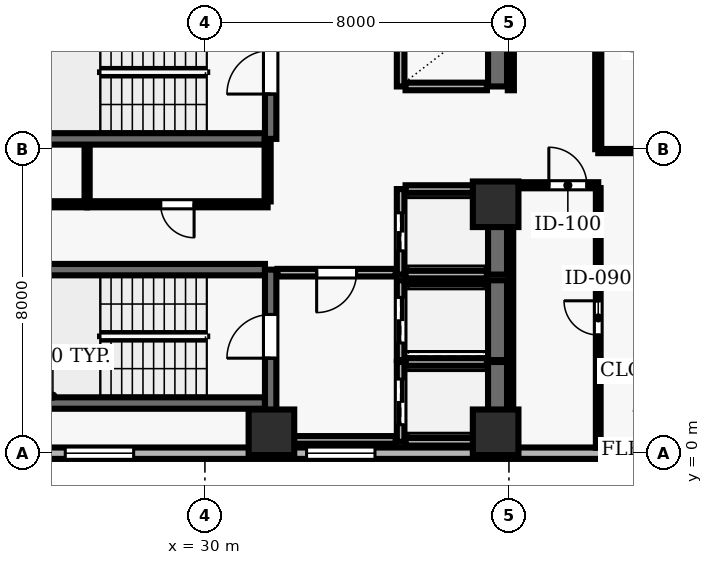
"""IFC4 building model, lengths in metres.
Left out: names, types, materials, properties, quantities, classifications, styles, units other than length and angle.
Written with IfcOpenShell. Run it as: python <this file> out.ifc"""

import sys

from ifc_helpers import new_model, si_unit, direction, frame, frame_2d, origin, origin_2d, place, context, subcontext, project, spatial, rectangle, extrude, element, fill, save


model = new_model("IFC4")
c1 = context("Model", 3, precision=1e-05, world=origin(), true_north=direction((0.0, 1.0)))
c2 = subcontext(c1, "Body", "Model", "MODEL_VIEW")
j1 = project(units=[si_unit("LENGTHUNIT", "METRE"), si_unit("PLANEANGLEUNIT", "RADIAN")], contexts=[c1])
p1 = place(None, origin())
s1 = spatial("IfcSite", under=j1, at=p1, CompositionType="ELEMENT")
p2 = place(p1, origin())
s2 = spatial("IfcBuilding", under=s1, at=p2, CompositionType="ELEMENT")
p3 = place(p2, frame((0.0, 0.0, 158.0)))
s3 = spatial("IfcBuildingStorey", under=s2, at=p3, CompositionType="ELEMENT", Elevation=158.0)
for number, where, z_axis, x_axis in (
    (1, (31.75, 0.55, 0.0), (0.0, 0.0, 1.0), (1.0, 0.0, 0.0)),
    (2, (37.65, 0.55, 0.0), (0.0, 0.0, 1.0), (1.0, 0.0, 0.0)),
    (3, (37.65, 6.55, 0.0), (0.0, 0.0, 1.0), (1.0, 0.0, 0.0)),
):
    element("IfcColumn", number, at=place(p3, frame(where, z_axis=z_axis, x_axis=x_axis)), inside=s3, PredefinedType="COLUMN", context=c2, shape_type="SweptSolid", body=[
        extrude(rectangle(XDim=1.2, YDim=1.2, at=origin_2d()), origin(), (0.0, 0.0, 1.0), 3.9),
    ])
p4 = place(p3, frame((24.5, 0.0, 0.0), z_axis=(0.0, 0.0, 1.0), x_axis=(1.0, 0.0, 0.0)))
e4 = element("IfcWall", 4, at=p4, inside=s3, PredefinedType="SOLIDWALL", context=c2, shape_type="SweptSolid", body=[
    extrude(rectangle(XDim=43.6, YDim=0.3, at=frame_2d((21.8, 0.0))), origin(), (0.0, 0.0, 1.0), 3.69),
])
p5 = place(p4, frame((1.825, 0.0, 0.9)))
e5 = element("IfcOpeningElement", 5, at=p5, cuts=e4, PredefinedType="OPENING", context=c2, shape_type="SweptSolid", body=[
    extrude(rectangle(XDim=1.8, YDim=1.6, at=frame_2d((0.9, 0.8))), frame((0.0, 0.16, 0.0), z_axis=(0.0, -1.0, 0.0), x_axis=(1.0, 0.0, 0.0)), (0.0, 0.0, 1.0), 0.32),
])
p6 = place(p4, frame((8.175, 0.0, 0.9)))
e6 = element("IfcOpeningElement", 6, at=p6, cuts=e4, PredefinedType="OPENING", context=c2, shape_type="SweptSolid", body=[
    extrude(rectangle(XDim=1.8, YDim=1.6, at=frame_2d((0.9, 0.8))), frame((0.0, 0.16, 0.0), z_axis=(0.0, -1.0, 0.0), x_axis=(1.0, 0.0, 0.0)), (0.0, 0.0, 1.0), 0.32),
])
p7 = place(p4, frame((18.175, 0.0, 0.9)))
e7 = element("IfcOpeningElement", 7, at=p7, cuts=e4, PredefinedType="OPENING", context=c2, shape_type="SweptSolid", body=[
    extrude(rectangle(XDim=1.8, YDim=1.6, at=frame_2d((0.9, 0.8))), frame((0.0, 0.16, 0.0), z_axis=(0.0, -1.0, 0.0), x_axis=(1.0, 0.0, 0.0)), (0.0, 0.0, 1.0), 0.32),
])
p8 = place(p4, frame((24.525, 0.0, 0.9)))
e8 = element("IfcOpeningElement", 8, at=p8, cuts=e4, PredefinedType="OPENING", context=c2, shape_type="SweptSolid", body=[
    extrude(rectangle(XDim=1.8, YDim=1.6, at=frame_2d((0.9, 0.8))), frame((0.0, 0.16, 0.0), z_axis=(0.0, -1.0, 0.0), x_axis=(1.0, 0.0, 0.0)), (0.0, 0.0, 1.0), 0.32),
])
p9 = place(p4, frame((29.075, 0.0, 0.9)))
e9 = element("IfcOpeningElement", 9, at=p9, cuts=e4, PredefinedType="OPENING", context=c2, shape_type="SweptSolid", body=[
    extrude(rectangle(XDim=1.8, YDim=1.6, at=frame_2d((0.9, 0.8))), frame((0.0, 0.16, 0.0), z_axis=(0.0, -1.0, 0.0), x_axis=(1.0, 0.0, 0.0)), (0.0, 0.0, 1.0), 0.32),
])
p10 = place(p4, frame((34.525, 0.0, 0.9)))
e10 = element("IfcOpeningElement", 10, at=p10, cuts=e4, PredefinedType="OPENING", context=c2, shape_type="SweptSolid", body=[
    extrude(rectangle(XDim=1.8, YDim=1.6, at=frame_2d((0.9, 0.8))), frame((0.0, 0.16, 0.0), z_axis=(0.0, -1.0, 0.0), x_axis=(1.0, 0.0, 0.0)), (0.0, 0.0, 1.0), 0.32),
])
p11 = place(p4, frame((39.975, 0.0, 0.9)))
e11 = element("IfcOpeningElement", 11, at=p11, cuts=e4, PredefinedType="OPENING", context=c2, shape_type="SweptSolid", body=[
    extrude(rectangle(XDim=1.8, YDim=1.6, at=frame_2d((0.9, 0.8))), frame((0.0, 0.16, 0.0), z_axis=(0.0, -1.0, 0.0), x_axis=(1.0, 0.0, 0.0)), (0.0, 0.0, 1.0), 0.32),
])
for number, where, z_axis, x_axis in (
    (12, (31.58, 4.83, 0.0), (0.0, 0.0, 1.0), (-1.0, 0.0, 0.0)),
    (13, (23.22, 1.32, 0.0), (0.0, 0.0, 1.0), (1.0, 0.0, 0.0)),
):
    element("IfcWall", number, at=place(p3, frame(where, z_axis=z_axis, x_axis=x_axis)), inside=s3, PredefinedType="SHEAR", context=c2, shape_type="SweptSolid", body=[
        extrude(rectangle(XDim=8.36, YDim=0.3, at=frame_2d((4.18, 0.0))), origin(), (0.0, 0.0, 1.0), 3.69),
    ])
p12 = place(p3, frame((31.73, 0.96, 0.0), z_axis=(0.0, 0.0, 1.0), x_axis=(0.0, 1.0, 0.0)))
e14 = element("IfcWall", 14, at=p12, inside=s3, PredefinedType="SHEAR", context=c2, shape_type="SweptSolid", body=[
    extrude(rectangle(XDim=3.87, YDim=0.3, at=frame_2d((1.935, 0.0))), origin(), (0.0, 0.0, 1.0), 3.69),
])
p13 = place(p12, frame((1.54, 0.0, 0.0)))
e15 = element("IfcOpeningElement", 15, at=p13, cuts=e14, PredefinedType="OPENING", context=c2, shape_type="SweptSolid", body=[
    extrude(rectangle(XDim=1.15, YDim=2.15, at=frame_2d((0.575, 1.075))), frame((0.0, 0.16, 0.0), z_axis=(0.0, -1.0, 0.0), x_axis=(1.0, 0.0, 0.0)), (0.0, 0.0, 1.0), 0.32),
])
p14 = place(p3, frame((23.22, 8.27, 0.0), z_axis=(0.0, 0.0, 1.0), x_axis=(1.0, 0.0, 0.0)))
e16 = element("IfcWall", 16, at=p14, inside=s3, PredefinedType="SHEAR", context=c2, shape_type="SweptSolid", body=[
    extrude(rectangle(XDim=8.36, YDim=0.3, at=frame_2d((4.18, 0.0))), origin(), (0.0, 0.0, 1.0), 3.69),
])
p15 = place(p3, frame((31.73, 8.27, 0.0), z_axis=(0.0, 0.0, 1.0), x_axis=(0.0, 1.0, 0.0)))
e17 = element("IfcWall", 17, at=p15, inside=s3, PredefinedType="SHEAR", context=c2, shape_type="SweptSolid", body=[
    extrude(rectangle(XDim=3.51, YDim=0.3, at=frame_2d((1.755, 0.0))), origin(), (0.0, 0.0, 1.0), 3.69),
])
p16 = place(p15, frame((1.18, 0.0, 0.0)))
e18 = element("IfcOpeningElement", 18, at=p16, cuts=e17, PredefinedType="OPENING", context=c2, shape_type="SweptSolid", body=[
    extrude(rectangle(XDim=1.15, YDim=2.15, at=frame_2d((0.575, 1.075))), frame((0.0, 0.16, 0.0), z_axis=(0.0, -1.0, 0.0), x_axis=(1.0, 0.0, 0.0)), (0.0, 0.0, 1.0), 0.32),
])
p17 = place(p3, frame((35.15, 2.4, 0.0), z_axis=(0.0, 0.0, 1.0), x_axis=(0.0, -1.0, 0.0)))
e19 = element("IfcWall", 19, at=p17, inside=s3, PredefinedType="SOLIDWALL", context=c2, shape_type="SweptSolid", body=[
    extrude(rectangle(XDim=2.1, YDim=0.2, at=frame_2d((1.05, 0.0))), origin(), (0.0, 0.0, 1.0), 3.69),
])
p18 = place(p17, frame((0.45, 0.0, 0.0)))
e20 = element("IfcOpeningElement", 20, at=p18, cuts=e19, PredefinedType="OPENING", context=c2, shape_type="SweptSolid", body=[
    extrude(rectangle(XDim=1.2, YDim=2.15, at=frame_2d((0.6, 1.075))), frame((0.0, 0.11, 0.0), z_axis=(0.0, -1.0, 0.0), x_axis=(1.0, 0.0, 0.0)), (0.0, 0.0, 1.0), 0.22),
])
p19 = place(p3, frame((37.7, 0.3, 0.0), z_axis=(0.0, 0.0, 1.0), x_axis=(0.0, 1.0, 0.0)))
e21 = element("IfcWall", 21, at=p19, inside=s3, PredefinedType="SHEAR", context=c2, shape_type="SweptSolid", body=[
    extrude(rectangle(XDim=2.1, YDim=0.5, at=frame_2d((1.05, 0.0))), origin(), (0.0, 0.0, 1.0), 3.69),
])
for number, where, z_axis, x_axis in (
    (22, (35.28, 0.3, 0.0), (0.0, 0.0, 1.0), (1.0, 0.0, 0.0)),
    (23, (37.42, 2.4, 0.0), (0.0, 0.0, 1.0), (-1.0, 0.0, 0.0)),
):
    element("IfcWall", number, at=place(p3, frame(where, z_axis=z_axis, x_axis=x_axis)), inside=s3, PredefinedType="SOLIDWALL", context=c2, shape_type="SweptSolid", body=[
        extrude(rectangle(XDim=2.14, YDim=0.2, at=frame_2d((1.07, 0.0))), origin(), (0.0, 0.0, 1.0), 3.69),
    ])
p20 = place(p3, frame((35.15, 4.55, 0.0), z_axis=(0.0, 0.0, 1.0), x_axis=(0.0, -1.0, 0.0)))
e24 = element("IfcWall", 24, at=p20, inside=s3, PredefinedType="SOLIDWALL", context=c2, shape_type="SweptSolid", body=[
    extrude(rectangle(XDim=2.1, YDim=0.2, at=frame_2d((1.05, 0.0))), origin(), (0.0, 0.0, 1.0), 3.69),
])
p21 = place(p20, frame((0.45, 0.0, 0.0)))
e25 = element("IfcOpeningElement", 25, at=p21, cuts=e24, PredefinedType="OPENING", context=c2, shape_type="SweptSolid", body=[
    extrude(rectangle(XDim=1.2, YDim=2.15, at=frame_2d((0.6, 1.075))), frame((0.0, 0.11, 0.0), z_axis=(0.0, -1.0, 0.0), x_axis=(1.0, 0.0, 0.0)), (0.0, 0.0, 1.0), 0.22),
])
p22 = place(p3, frame((37.7, 2.45, 0.0), z_axis=(0.0, 0.0, 1.0), x_axis=(0.0, 1.0, 0.0)))
e26 = element("IfcWall", 26, at=p22, inside=s3, PredefinedType="SHEAR", context=c2, shape_type="SweptSolid", body=[
    extrude(rectangle(XDim=2.1, YDim=0.5, at=frame_2d((1.05, 0.0))), origin(), (0.0, 0.0, 1.0), 3.69),
])
p23 = place(p3, frame((37.42, 4.55, 0.0), z_axis=(0.0, 0.0, 1.0), x_axis=(-1.0, 0.0, 0.0)))
e27 = element("IfcWall", 27, at=p23, inside=s3, PredefinedType="SOLIDWALL", context=c2, shape_type="SweptSolid", body=[
    extrude(rectangle(XDim=2.14, YDim=0.2, at=frame_2d((1.07, 0.0))), origin(), (0.0, 0.0, 1.0), 3.69),
])
p24 = place(p3, frame((35.15, 6.95, 0.0), z_axis=(0.0, 0.0, 1.0), x_axis=(0.0, -1.0, 0.0)))
e28 = element("IfcWall", 28, at=p24, inside=s3, PredefinedType="SOLIDWALL", context=c2, shape_type="SweptSolid", body=[
    extrude(rectangle(XDim=2.25, YDim=0.2, at=frame_2d((1.125, 0.0))), origin(), (0.0, 0.0, 1.0), 3.69),
])
p25 = place(p24, frame((0.625, 0.0, 0.0)))
e29 = element("IfcOpeningElement", 29, at=p25, cuts=e28, PredefinedType="OPENING", context=c2, shape_type="SweptSolid", body=[
    extrude(rectangle(XDim=1.0, YDim=2.1, at=frame_2d((0.5, 1.05))), frame((0.0, 0.11, 0.0), z_axis=(0.0, -1.0, 0.0), x_axis=(1.0, 0.0, 0.0)), (0.0, 0.0, 1.0), 0.22),
])
p26 = place(p3, frame((37.7, 4.7, 0.0), z_axis=(0.0, 0.0, 1.0), x_axis=(0.0, 1.0, 0.0)))
e30 = element("IfcWall", 30, at=p26, inside=s3, PredefinedType="SHEAR", context=c2, shape_type="SweptSolid", body=[
    extrude(rectangle(XDim=2.25, YDim=0.5, at=frame_2d((1.125, 0.0))), origin(), (0.0, 0.0, 1.0), 3.69),
])
for number, where, z_axis, x_axis in (
    (31, (35.28, 4.7, 0.0), (0.0, 0.0, 1.0), (1.0, 0.0, 0.0)),
    (32, (37.42, 6.95, 0.0), (0.0, 0.0, 1.0), (-1.0, 0.0, 0.0)),
):
    element("IfcWall", number, at=place(p3, frame(where, z_axis=z_axis, x_axis=x_axis)), inside=s3, PredefinedType="SOLIDWALL", context=c2, shape_type="SweptSolid", body=[
        extrude(rectangle(XDim=2.14, YDim=0.2, at=frame_2d((1.07, 0.0))), origin(), (0.0, 0.0, 1.0), 3.69),
    ])
p27 = place(p3, frame((35.15, 11.55, 0.0), z_axis=(0.0, 0.0, 1.0), x_axis=(0.0, -1.0, 0.0)))
e33 = element("IfcWall", 33, at=p27, inside=s3, PredefinedType="SOLIDWALL", context=c2, shape_type="SweptSolid", body=[
    extrude(rectangle(XDim=1.9, YDim=0.2, at=frame_2d((0.95, 0.0))), origin(), (0.0, 0.0, 1.0), 3.69),
])
p28 = place(p3, frame((37.7, 9.65, 0.0), z_axis=(0.0, 0.0, 1.0), x_axis=(0.0, 1.0, 0.0)))
e34 = element("IfcWall", 34, at=p28, inside=s3, PredefinedType="SHEAR", context=c2, shape_type="SweptSolid", body=[
    extrude(rectangle(XDim=1.9, YDim=0.5, at=frame_2d((0.95, 0.0))), origin(), (0.0, 0.0, 1.0), 3.69),
])
p29 = place(p3, frame((35.28, 9.65, 0.0), z_axis=(0.0, 0.0, 1.0), x_axis=(1.0, 0.0, 0.0)))
e35 = element("IfcWall", 35, at=p29, inside=s3, PredefinedType="SOLIDWALL", context=c2, shape_type="SweptSolid", body=[
    extrude(rectangle(XDim=2.14, YDim=0.2, at=frame_2d((1.07, 0.0))), origin(), (0.0, 0.0, 1.0), 3.69),
])
p30 = place(p3, frame((26.9, 6.55, 0.0), z_axis=(0.0, 0.0, 1.0), x_axis=(-1.0, 0.0, 0.0)))
e36 = element("IfcWall", 36, at=p30, inside=s3, PredefinedType="PARTITIONING", context=c2, shape_type="SweptSolid", body=[
    extrude(rectangle(XDim=4.7, YDim=0.16, at=frame_2d((2.35, 0.0))), origin(), (0.0, 0.0, 1.0), 3.69),
])
p31 = place(p30, frame((1.91, 0.0, 0.0)))
e37 = element("IfcOpeningElement", 37, at=p31, cuts=e36, PredefinedType="OPENING", context=c2, shape_type="SweptSolid", body=[
    extrude(rectangle(XDim=0.88, YDim=2.1, at=frame_2d((0.44, 1.05))), frame((0.0, 0.09, 0.0), z_axis=(0.0, -1.0, 0.0), x_axis=(1.0, 0.0, 0.0)), (0.0, 0.0, 1.0), 0.18),
])
p32 = place(p3, frame((31.65, 0.35, 0.0), z_axis=(0.0, 0.0, 1.0), x_axis=(1.0, 0.0, 0.0)))
e38 = element("IfcWall", 38, at=p32, inside=s3, PredefinedType="SOLIDWALL", context=c2, shape_type="SweptSolid", body=[
    extrude(rectangle(XDim=3.37, YDim=0.2, at=frame_2d((1.685, 0.0))), origin(), (0.0, 0.0, 1.0), 3.69),
])
p33 = place(p3, frame((31.65, 6.55, 0.0), z_axis=(0.0, 0.0, 1.0), x_axis=(-1.0, 0.0, 0.0)))
e39 = element("IfcWall", 39, at=p33, inside=s3, PredefinedType="PARTITIONING", context=c2, shape_type="SweptSolid", body=[
    extrude(rectangle(XDim=4.75, YDim=0.16, at=frame_2d((2.375, 0.0))), origin(), (0.0, 0.0, 1.0), 3.69),
])
p34 = place(p33, frame((1.935, 0.0, 0.0)))
e40 = element("IfcOpeningElement", 40, at=p34, cuts=e39, PredefinedType="OPENING", context=c2, shape_type="SweptSolid", body=[
    extrude(rectangle(XDim=0.88, YDim=2.1, at=frame_2d((0.44, 1.05))), frame((0.0, 0.09, 0.0), z_axis=(0.0, -1.0, 0.0), x_axis=(1.0, 0.0, 0.0)), (0.0, 0.0, 1.0), 0.18),
])
p35 = place(p3, frame((35.02, 4.75, 0.0), z_axis=(0.0, 0.0, 1.0), x_axis=(-1.0, 0.0, 0.0)))
e41 = element("IfcWall", 41, at=p35, inside=s3, PredefinedType="SOLIDWALL", context=c2, shape_type="SweptSolid", body=[
    extrude(rectangle(XDim=3.11, YDim=0.2, at=frame_2d((1.555, 0.0))), origin(), (0.0, 0.0, 1.0), 3.69),
])
p36 = place(p35, frame((1.03, 0.0, 0.0)))
e42 = element("IfcOpeningElement", 42, at=p36, cuts=e41, PredefinedType="OPENING", context=c2, shape_type="SweptSolid", body=[
    extrude(rectangle(XDim=1.05, YDim=2.15, at=frame_2d((0.525, 1.075))), frame((0.0, 0.11, 0.0), z_axis=(0.0, -1.0, 0.0), x_axis=(1.0, 0.0, 0.0)), (0.0, 0.0, 1.0), 0.22),
])
p37 = place(p3, frame((38.05, 7.05, 0.0), z_axis=(0.0, 0.0, 1.0), x_axis=(1.0, 0.0, 0.0)))
e43 = element("IfcWall", 43, at=p37, inside=s3, PredefinedType="PARTITIONING", context=c2, shape_type="SweptSolid", body=[
    extrude(rectangle(XDim=2.3, YDim=0.16, at=frame_2d((1.15, 0.0))), origin(), (0.0, 0.0, 1.0), 3.69),
])
p38 = place(p37, frame((1.0, 0.0, 0.0)))
e44 = element("IfcOpeningElement", 44, at=p38, cuts=e43, PredefinedType="OPENING", context=c2, shape_type="SweptSolid", body=[
    extrude(rectangle(XDim=1.0, YDim=2.1, at=frame_2d((0.5, 1.05))), frame((0.0, 0.09, 0.0), z_axis=(0.0, -1.0, 0.0), x_axis=(1.0, 0.0, 0.0)), (0.0, 0.0, 1.0), 0.18),
])
p39 = place(p3, frame((48.22, 7.95, 0.0), z_axis=(0.0, 0.0, 1.0), x_axis=(-1.0, 0.0, 0.0)))
e45 = element("IfcWall", 45, at=p39, inside=s3, PredefinedType="MOVABLE", context=c2, shape_type="SweptSolid", body=[
    extrude(rectangle(XDim=7.87, YDim=0.11, at=frame_2d((3.935, 0.0))), origin(), (0.0, 0.0, 1.0), 3.074),
])
p40 = place(p3, frame((26.9, 6.625, 0.0), z_axis=(0.0, 0.0, 1.0), x_axis=(0.0, 1.0, 0.0)))
e46 = element("IfcWall", 46, at=p40, inside=s3, PredefinedType="PARTITIONING", context=c2, shape_type="SweptSolid", body=[
    extrude(rectangle(XDim=1.465, YDim=0.135, at=frame_2d((0.732, 0.0))), origin(), (0.0, 0.0, 1.0), 3.69),
])
p41 = place(p3, frame((31.65, 8.24, 0.0), z_axis=(0.0, 0.0, 1.0), x_axis=(0.0, -1.0, 0.0)))
e47 = element("IfcWall", 47, at=p41, inside=s3, PredefinedType="PARTITIONING", context=c2, shape_type="SweptSolid", body=[
    extrude(rectangle(XDim=1.615, YDim=0.16, at=frame_2d((0.808, 0.0))), origin(), (0.0, 0.0, 1.0), 3.69),
])
p42 = place(p3, frame((38.05, 6.975, 0.0), z_axis=(0.0, 0.0, 1.0), x_axis=(0.0, -1.0, 0.0)))
e48 = element("IfcWall", 48, at=p42, inside=s3, PredefinedType="PARTITIONING", context=c2, shape_type="SweptSolid", body=[
    extrude(rectangle(XDim=6.83, YDim=0.125, at=frame_2d((3.415, 0.0))), origin(), (0.0, 0.0, 1.0), 3.074),
])
p43 = place(p3, frame((38.05, 15.925, 0.0), z_axis=(0.0, 0.0, 1.0), x_axis=(0.0, -1.0, 0.0)))
e49 = element("IfcWall", 49, at=p43, inside=s3, PredefinedType="PARTITIONING", context=c2, shape_type="SweptSolid", body=[
    extrude(rectangle(XDim=6.375, YDim=0.16, at=frame_2d((3.188, 0.0))), origin(), (0.0, 0.0, 1.0), 3.074),
])
p44 = place(p3, frame((40.35, 0.145, 0.0), z_axis=(0.0, 0.0, 1.0), x_axis=(0.0, 1.0, 0.0)))
e50 = element("IfcWall", 50, at=p44, inside=s3, PredefinedType="PARTITIONING", context=c2, shape_type="SweptSolid", body=[
    extrude(rectangle(XDim=6.83, YDim=0.125, at=frame_2d((3.415, 0.0))), origin(), (0.0, 0.0, 1.0), 3.69),
])
p45 = place(p44, frame((2.965, 0.0, 0.0)))
e51 = element("IfcOpeningElement", 51, at=p45, cuts=e50, PredefinedType="OPENING", context=c2, shape_type="SweptSolid", body=[
    extrude(rectangle(XDim=0.9, YDim=2.1, at=frame_2d((0.45, 1.05))), frame((0.0, 0.073, 0.0), z_axis=(0.0, -1.0, 0.0), x_axis=(1.0, 0.0, 0.0)), (0.0, 0.0, 1.0), 0.145),
])
p46 = place(p3, frame((40.35, 8.0, 0.0), z_axis=(0.0, 0.0, 1.0), x_axis=(0.0, 1.0, 0.0)))
e52 = element("IfcWall", 52, at=p46, inside=s3, PredefinedType="PARTITIONING", context=c2, shape_type="SweptSolid", body=[
    extrude(rectangle(XDim=5.575, YDim=0.16, at=frame_2d((2.788, 0.0))), origin(), (0.0, 0.0, 1.0), 3.69),
])
p47 = place(p5, origin())
e53 = element("IfcWindow", 53, at=p47, inside=s3, PartitioningType="SINGLE_PANEL", PredefinedType="WINDOW", context=c2, shape_type="SweptSolid", body=[
    extrude(rectangle(XDim=1.8, YDim=1.6, at=frame_2d((0.9, 0.8))), frame((0.0, 0.03, 0.0), z_axis=(0.0, -1.0, 0.0), x_axis=(1.0, 0.0, 0.0)), (0.0, 0.0, 1.0), 0.06),
])
fill(e5, e53)
p48 = place(p6, origin())
e54 = element("IfcWindow", 54, at=p48, inside=s3, PartitioningType="SINGLE_PANEL", PredefinedType="WINDOW", context=c2, shape_type="SweptSolid", body=[
    extrude(rectangle(XDim=1.8, YDim=1.6, at=frame_2d((0.9, 0.8))), frame((0.0, 0.03, 0.0), z_axis=(0.0, -1.0, 0.0), x_axis=(1.0, 0.0, 0.0)), (0.0, 0.0, 1.0), 0.06),
])
fill(e6, e54)
p49 = place(p13, origin())
e55 = element("IfcDoor", 55, at=p49, inside=s3, OperationType="SINGLE_SWING_LEFT", PredefinedType="DOOR", context=c2, shape_type="SweptSolid", body=[
    extrude(rectangle(XDim=1.15, YDim=2.15, at=frame_2d((0.575, 1.075))), frame((0.0, 0.025, 0.0), z_axis=(0.0, -1.0, 0.0), x_axis=(1.0, 0.0, 0.0)), (0.0, 0.0, 1.0), 0.05),
])
fill(e15, e55)
p50 = place(p16, origin())
e56 = element("IfcDoor", 56, at=p50, inside=s3, OperationType="SINGLE_SWING_LEFT", PredefinedType="DOOR", context=c2, shape_type="SweptSolid", body=[
    extrude(rectangle(XDim=1.15, YDim=2.15, at=frame_2d((0.575, 1.075))), frame((0.0, 0.025, 0.0), z_axis=(0.0, -1.0, 0.0), x_axis=(1.0, 0.0, 0.0)), (0.0, 0.0, 1.0), 0.05),
])
fill(e18, e56)
p51 = place(p18, origin())
e57 = element("IfcDoor", 57, at=p51, inside=s3, OperationType="DOUBLE_DOOR_SLIDING", PredefinedType="DOOR", context=c2, shape_type="SweptSolid", body=[
    extrude(rectangle(XDim=1.2, YDim=2.15, at=frame_2d((0.6, 1.075))), frame((0.0, 0.025, 0.0), z_axis=(0.0, -1.0, 0.0), x_axis=(1.0, 0.0, 0.0)), (0.0, 0.0, 1.0), 0.05),
])
fill(e20, e57)
p52 = place(p21, origin())
e58 = element("IfcDoor", 58, at=p52, inside=s3, OperationType="DOUBLE_DOOR_SLIDING", PredefinedType="DOOR", context=c2, shape_type="SweptSolid", body=[
    extrude(rectangle(XDim=1.2, YDim=2.15, at=frame_2d((0.6, 1.075))), frame((0.0, 0.025, 0.0), z_axis=(0.0, -1.0, 0.0), x_axis=(1.0, 0.0, 0.0)), (0.0, 0.0, 1.0), 0.05),
])
fill(e25, e58)
p53 = place(p25, origin())
e59 = element("IfcDoor", 59, at=p53, inside=s3, OperationType="DOUBLE_DOOR_SLIDING", PredefinedType="DOOR", context=c2, shape_type="SweptSolid", body=[
    extrude(rectangle(XDim=1.0, YDim=2.1, at=frame_2d((0.5, 1.05))), frame((0.0, 0.025, 0.0), z_axis=(0.0, -1.0, 0.0), x_axis=(1.0, 0.0, 0.0)), (0.0, 0.0, 1.0), 0.05),
])
fill(e29, e59)
p54 = place(p36, origin())
e60 = element("IfcDoor", 60, at=p54, inside=s3, OperationType="SINGLE_SWING_RIGHT", PredefinedType="DOOR", context=c2, shape_type="SweptSolid", body=[
    extrude(rectangle(XDim=1.05, YDim=2.15, at=frame_2d((0.525, 1.075))), frame((0.0, 0.025, 0.0), z_axis=(0.0, -1.0, 0.0), x_axis=(1.0, 0.0, 0.0)), (0.0, 0.0, 1.0), 0.05),
])
fill(e42, e60)
p55 = place(p34, origin())
e61 = element("IfcDoor", 61, at=p55, inside=s3, OperationType="SINGLE_SWING_LEFT", PredefinedType="DOOR", context=c2, shape_type="SweptSolid", body=[
    extrude(rectangle(XDim=0.88, YDim=2.1, at=frame_2d((0.44, 1.05))), frame((0.0, 0.025, 0.0), z_axis=(0.0, -1.0, 0.0), x_axis=(1.0, 0.0, 0.0)), (0.0, 0.0, 1.0), 0.05),
])
fill(e40, e61)
p56 = place(p38, origin())
e62 = element("IfcDoor", 62, at=p56, inside=s3, OperationType="SINGLE_SWING_LEFT", PredefinedType="DOOR", context=c2, shape_type="SweptSolid", body=[
    extrude(rectangle(XDim=1.0, YDim=2.1, at=frame_2d((0.5, 1.05))), frame((0.0, 0.025, 0.0), z_axis=(0.0, -1.0, 0.0), x_axis=(1.0, 0.0, 0.0)), (0.0, 0.0, 1.0), 0.05),
])
fill(e44, e62)
p57 = place(p45, origin())
e63 = element("IfcDoor", 63, at=p57, inside=s3, OperationType="SINGLE_SWING_RIGHT", PredefinedType="DOOR", context=c2, shape_type="SweptSolid", body=[
    extrude(rectangle(XDim=0.9, YDim=2.1, at=frame_2d((0.45, 1.05))), frame((0.0, 0.025, 0.0), z_axis=(0.0, -1.0, 0.0), x_axis=(1.0, 0.0, 0.0)), (0.0, 0.0, 1.0), 0.05),
])
fill(e51, e63)
save(model, sys.argv[1])
